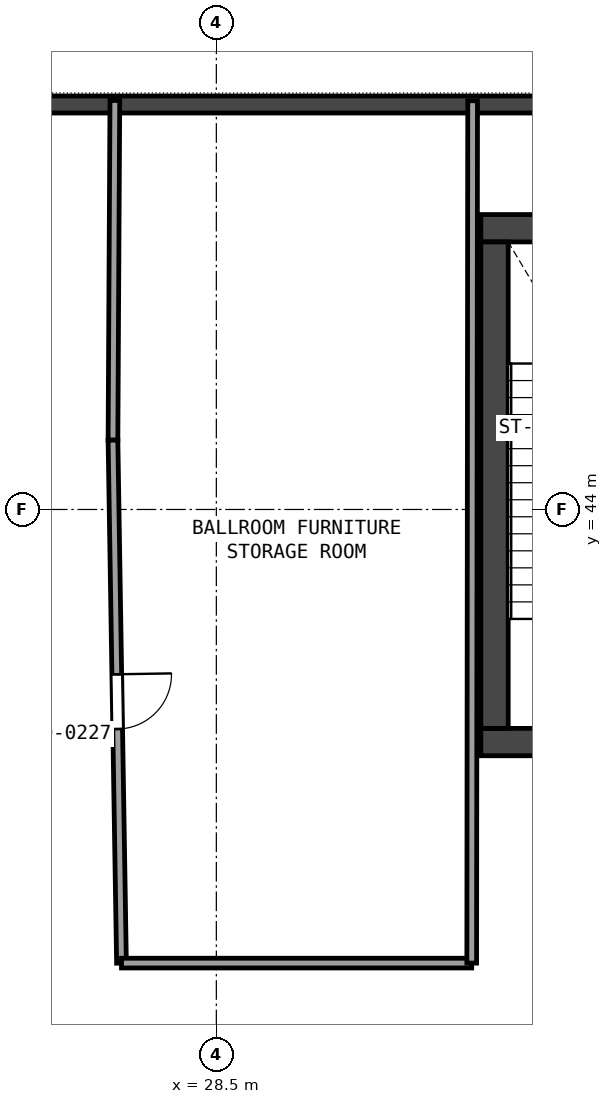
"""IFC4 building model, lengths in metres.
Left out: names, types, materials, properties, quantities, classifications, styles, units other than length and angle.
Written with IfcOpenShell. Run it as: python <this file> out.ifc"""

import sys

from ifc_helpers import new_model, si_unit, direction, frame, frame_2d, origin, place, context, subcontext, project, spatial, rectangle, extrude, element, fill, save


model = new_model("IFC4")
c1 = context("Model", 3, precision=1e-05, world=origin(), true_north=direction((0.0, 1.0)))
c2 = subcontext(c1, "Body", "Model", "MODEL_VIEW")
j1 = project(units=[si_unit("LENGTHUNIT", "METRE"), si_unit("PLANEANGLEUNIT", "RADIAN")], contexts=[c1])
p1 = place(None, origin())
s1 = spatial("IfcSite", under=j1, at=p1, CompositionType="ELEMENT")
p2 = place(p1, origin())
s2 = spatial("IfcBuilding", under=s1, at=p2, CompositionType="ELEMENT")
p3 = place(p2, frame((0.0, 0.0, 10.8)))
s3 = spatial("IfcBuildingStorey", under=s2, at=p3, CompositionType="ELEMENT", Elevation=10.8)
for number, where, z_axis, x_axis in (
    (1, (32.85, 40.175, 0.0), (0.0, 0.0, 1.0), (1.0, 0.0, 0.0)),
    (2, (32.85, 48.625, 0.0), (0.0, 0.0, 1.0), (1.0, 0.0, 0.0)),
):
    element("IfcWall", number, at=place(p3, frame(where, z_axis=z_axis, x_axis=x_axis)), inside=s3, PredefinedType="SHEAR", context=c2, shape_type="SweptSolid", body=[
        extrude(rectangle(XDim=4.6, YDim=0.45, at=frame_2d((2.3, 0.0))), origin(), (0.0, 0.0, 1.0), 5.05),
    ])
p4 = place(p3, frame((33.075, 40.4, 0.0), z_axis=(0.0, 0.0, 1.0), x_axis=(0.0, 1.0, 0.0)))
e3 = element("IfcWall", 3, at=p4, inside=s3, PredefinedType="SHEAR", context=c2, shape_type="SweptSolid", body=[
    extrude(rectangle(XDim=8.0, YDim=0.45, at=frame_2d((4.0, 0.0))), origin(), (0.0, 0.0, 1.0), 5.05),
])
p5 = place(p3, frame((3.74, 50.66, 0.0), z_axis=(0.0, 0.0, 1.0), x_axis=(1.0, 0.0, 0.0)))
e4 = element("IfcWall", 4, at=p5, inside=s3, PredefinedType="SOLIDWALL", context=c2, shape_type="SweptSolid", body=[
    extrude(rectangle(XDim=67.32, YDim=0.28, at=frame_2d((33.66, 0.0))), origin(), (0.0, 0.0, 1.0), 5.05),
])
p6 = place(p5, frame((13.91, 0.0, 0.95)))
e5 = element("IfcOpeningElement", 5, at=p6, cuts=e4, PredefinedType="OPENING", context=c2, shape_type="SweptSolid", body=[
    extrude(rectangle(XDim=1.8, YDim=2.3, at=frame_2d((0.9, 1.15))), frame((0.0, 0.15, 0.0), z_axis=(0.0, -1.0, 0.0), x_axis=(1.0, 0.0, 0.0)), (0.0, 0.0, 1.0), 0.3),
])
p7 = place(p5, frame((31.414, 0.0, 0.95)))
e6 = element("IfcOpeningElement", 6, at=p7, cuts=e4, PredefinedType="OPENING", context=c2, shape_type="SweptSolid", body=[
    extrude(rectangle(XDim=1.8, YDim=2.3, at=frame_2d((0.9, 1.15))), frame((0.0, 0.15, 0.0), z_axis=(0.0, -1.0, 0.0), x_axis=(1.0, 0.0, 0.0)), (0.0, 0.0, 1.0), 0.3),
])
p8 = place(p3, frame((26.831, 50.726, 0.0), z_axis=(0.0, 0.0, 1.0), x_axis=(-0.005550371215, -0.999984596571, 0.0)))
e7 = element("IfcWall", 7, at=p8, inside=s3, PredefinedType="PARTITIONING", context=c2, shape_type="SweptSolid", body=[
    extrude(rectangle(XDim=5.586, YDim=0.16, at=frame_2d((2.793, 0.0))), origin(), (0.0, 0.0, 1.0), 4.191),
])
p9 = place(p3, frame((26.8, 45.14, 0.0), z_axis=(0.0, 0.0, 1.0), x_axis=(0.016264704162, -0.99986772095, 0.0)))
e8 = element("IfcWall", 8, at=p9, inside=s3, PredefinedType="PARTITIONING", context=c2, shape_type="SweptSolid", body=[
    extrude(rectangle(XDim=8.601, YDim=0.16, at=frame_2d((4.301, 0.0))), origin(), (0.0, 0.0, 1.0), 5.05),
])
p10 = place(p9, frame((3.851, 0.0, 0.0)))
e9 = element("IfcOpeningElement", 9, at=p10, cuts=e8, PredefinedType="OPENING", context=c2, shape_type="SweptSolid", body=[
    extrude(rectangle(XDim=0.9, YDim=2.0, at=frame_2d((0.45, 1.0))), frame((0.0, 0.09, 0.0), z_axis=(0.0, -1.0, 0.0), x_axis=(1.0, 0.0, 0.0)), (0.0, 0.0, 1.0), 0.18),
])
p11 = place(p3, frame((26.94, 36.54, 0.0), z_axis=(0.0, 0.0, 1.0), x_axis=(1.0, 0.0, 0.0)))
e10 = element("IfcWall", 10, at=p11, inside=s3, PredefinedType="PARTITIONING", context=c2, shape_type="SweptSolid", body=[
    extrude(rectangle(XDim=5.76, YDim=0.16, at=frame_2d((2.88, 0.0))), origin(), (0.0, 0.0, 1.0), 5.05),
])
p12 = place(p3, frame((32.7, 36.54, 0.0), z_axis=(0.0, 0.0, 1.0), x_axis=(0.001067400614, 0.999999430328, 0.0)))
e11 = element("IfcWall", 11, at=p12, inside=s3, PredefinedType="PARTITIONING", context=c2, shape_type="SweptSolid", body=[
    extrude(rectangle(XDim=14.181, YDim=0.16, at=frame_2d((7.09, 0.0))), origin(), (0.0, 0.0, 1.0), 4.191),
])
p13 = place(p10, origin())
e12 = element("IfcDoor", 12, at=p13, inside=s3, OperationType="SINGLE_SWING_LEFT", PredefinedType="DOOR", context=c2, shape_type="SweptSolid", body=[
    extrude(rectangle(XDim=0.9, YDim=2.0, at=frame_2d((0.45, 1.0))), frame((0.0, 0.025, 0.0), z_axis=(0.0, -1.0, 0.0), x_axis=(1.0, 0.0, 0.0)), (0.0, 0.0, 1.0), 0.05),
])
fill(e9, e12)
save(model, sys.argv[1])
